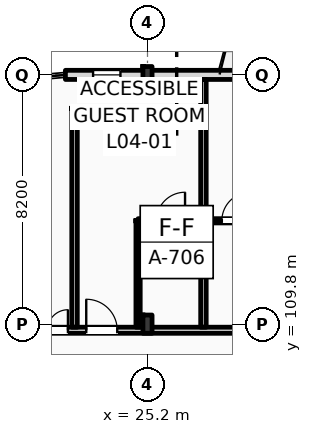
"""IFC4 building model, lengths in metres.
Left out: names, types, materials, properties, quantities, classifications, styles, units other than length and angle.
Written with IfcOpenShell. Run it as: python <this file> out.ifc"""

import sys

from ifc_helpers import new_model, si_unit, direction, frame, frame_2d, origin, origin_2d, place, context, subcontext, project, spatial, rectangle, i_section, extrude, element, fill, save


model = new_model("IFC4")
c1 = context("Model", 3, precision=1e-05, world=origin(), true_north=direction((0.0, 1.0)))
c2 = subcontext(c1, "Body", "Model", "MODEL_VIEW")
j1 = project(units=[si_unit("LENGTHUNIT", "METRE"), si_unit("PLANEANGLEUNIT", "RADIAN")], contexts=[c1])
p1 = place(None, origin())
s1 = spatial("IfcSite", under=j1, at=p1, CompositionType="ELEMENT")
p2 = place(p1, origin())
s2 = spatial("IfcBuilding", under=s1, at=p2, CompositionType="ELEMENT")
p3 = place(p2, frame((0.0, 0.0, 20.4)))
s3 = spatial("IfcBuildingStorey", under=s2, at=p3, CompositionType="ELEMENT", Elevation=20.4)
p4 = place(p3, frame((25.2, 109.8, 0.0), z_axis=(0.0, 0.0, 1.0), x_axis=(1.0, 0.0, 0.0)))
e1 = element("IfcColumn", 1, at=p4, inside=s3, PredefinedType="COLUMN", context=c2, shape_type="SweptSolid", body=[
    extrude(i_section(OverallWidth=0.3, OverallDepth=0.6, WebThickness=0.015, FlangeThickness=0.03, FilletRadius=0.027, at=origin_2d()), origin(), (0.0, 0.0, 1.0), 4.2),
])
p5 = place(p3, frame((25.2, 118.0, 0.0), z_axis=(0.0, 0.0, 1.0), x_axis=(1.0, 0.0, 0.0)))
e2 = element("IfcColumn", 2, at=p5, inside=s3, PredefinedType="COLUMN", context=c2, shape_type="SweptSolid", body=[
    extrude(i_section(OverallWidth=0.3, OverallDepth=0.55, WebThickness=0.015, FlangeThickness=0.029, FilletRadius=0.027, at=origin_2d()), origin(), (0.0, 0.0, 1.0), 4.2),
])
p6 = place(p3, frame((22.5, 118.0, 0.0), z_axis=(0.0, 0.0, 1.0), x_axis=(1.0, 0.0, 0.0)))
e3 = element("IfcWall", 3, at=p6, inside=s3, PredefinedType="STANDARD", context=c2, shape_type="SweptSolid", body=[
    extrude(rectangle(XDim=97.5, YDim=0.3, at=frame_2d((48.75, 0.0))), origin(), (0.0, 0.0, 1.0), 3.38),
])
p7 = place(p6, frame((0.91, 0.0, 0.9)))
e4 = element("IfcOpeningElement", 4, at=p7, cuts=e3, PredefinedType="OPENING", context=c2, shape_type="SweptSolid", body=[
    extrude(rectangle(XDim=0.9, YDim=1.8, at=frame_2d((0.45, 0.9))), frame((0.0, 0.16, 0.0), z_axis=(0.0, -1.0, 0.0), x_axis=(1.0, 0.0, 0.0)), (0.0, 0.0, 1.0), 0.32),
])
p8 = place(p6, frame((6.36, 0.0, 0.0)))
e5 = element("IfcOpeningElement", 5, at=p8, cuts=e3, PredefinedType="OPENING", context=c2, shape_type="SweptSolid", body=[
    extrude(rectangle(XDim=1.2, YDim=2.25, at=frame_2d((0.6, 1.125))), frame((0.0, 0.16, 0.0), z_axis=(0.0, -1.0, 0.0), x_axis=(1.0, 0.0, 0.0)), (0.0, 0.0, 1.0), 0.32),
])
p9 = place(p6, frame((11.41, 0.0, 0.9)))
e6 = element("IfcOpeningElement", 6, at=p9, cuts=e3, PredefinedType="OPENING", context=c2, shape_type="SweptSolid", body=[
    extrude(rectangle(XDim=1.1, YDim=1.9, at=frame_2d((0.55, 0.95))), frame((0.0, 0.16, 0.0), z_axis=(0.0, -1.0, 0.0), x_axis=(1.0, 0.0, 0.0)), (0.0, 0.0, 1.0), 0.32),
])
p10 = place(p6, frame((14.335, 0.0, 0.9)))
e7 = element("IfcOpeningElement", 7, at=p10, cuts=e3, PredefinedType="OPENING", context=c2, shape_type="SweptSolid", body=[
    extrude(rectangle(XDim=1.65, YDim=1.95, at=frame_2d((0.825, 0.975))), frame((0.0, 0.16, 0.0), z_axis=(0.0, -1.0, 0.0), x_axis=(1.0, 0.0, 0.0)), (0.0, 0.0, 1.0), 0.32),
])
p11 = place(p6, frame((19.26, 0.0, 0.9)))
e8 = element("IfcOpeningElement", 8, at=p11, cuts=e3, PredefinedType="OPENING", context=c2, shape_type="SweptSolid", body=[
    extrude(rectangle(XDim=1.35, YDim=2.0, at=frame_2d((0.675, 1.0))), frame((0.0, 0.16, 0.0), z_axis=(0.0, -1.0, 0.0), x_axis=(1.0, 0.0, 0.0)), (0.0, 0.0, 1.0), 0.32),
])
p12 = place(p6, frame((22.8, 0.0, 0.0)))
e9 = element("IfcOpeningElement", 9, at=p12, cuts=e3, PredefinedType="OPENING", context=c2, shape_type="SweptSolid", body=[
    extrude(rectangle(XDim=1.2, YDim=2.25, at=frame_2d((0.6, 1.125))), frame((0.0, 0.16, 0.0), z_axis=(0.0, -1.0, 0.0), x_axis=(1.0, 0.0, 0.0)), (0.0, 0.0, 1.0), 0.32),
])
p13 = place(p6, frame((26.91, 0.0, 0.9)))
e10 = element("IfcOpeningElement", 10, at=p13, cuts=e3, PredefinedType="OPENING", context=c2, shape_type="SweptSolid", body=[
    extrude(rectangle(XDim=2.1, YDim=2.1, at=frame_2d((1.05, 1.05))), frame((0.0, 0.16, 0.0), z_axis=(0.0, -1.0, 0.0), x_axis=(1.0, 0.0, 0.0)), (0.0, 0.0, 1.0), 0.32),
])
p14 = place(p6, frame((30.835, 0.0, 0.9)))
e11 = element("IfcOpeningElement", 11, at=p14, cuts=e3, PredefinedType="OPENING", context=c2, shape_type="SweptSolid", body=[
    extrude(rectangle(XDim=2.25, YDim=2.15, at=frame_2d((1.125, 1.075))), frame((0.0, 0.16, 0.0), z_axis=(0.0, -1.0, 0.0), x_axis=(1.0, 0.0, 0.0)), (0.0, 0.0, 1.0), 0.32),
])
p15 = place(p6, frame((34.96, 0.0, 0.9)))
e12 = element("IfcOpeningElement", 12, at=p15, cuts=e3, PredefinedType="OPENING", context=c2, shape_type="SweptSolid", body=[
    extrude(rectangle(XDim=2.4, YDim=2.2, at=frame_2d((1.2, 1.1))), frame((0.0, 0.16, 0.0), z_axis=(0.0, -1.0, 0.0), x_axis=(1.0, 0.0, 0.0)), (0.0, 0.0, 1.0), 0.32),
])
p16 = place(p6, frame((39.0, 0.0, 0.0)))
e13 = element("IfcOpeningElement", 13, at=p16, cuts=e3, PredefinedType="OPENING", context=c2, shape_type="SweptSolid", body=[
    extrude(rectangle(XDim=1.2, YDim=2.25, at=frame_2d((0.6, 1.125))), frame((0.0, 0.16, 0.0), z_axis=(0.0, -1.0, 0.0), x_axis=(1.0, 0.0, 0.0)), (0.0, 0.0, 1.0), 0.32),
])
p17 = place(p6, frame((43.21, 0.0, 0.9)))
e14 = element("IfcOpeningElement", 14, at=p17, cuts=e3, PredefinedType="OPENING", context=c2, shape_type="SweptSolid", body=[
    extrude(rectangle(XDim=2.7, YDim=2.3, at=frame_2d((1.35, 1.15))), frame((0.0, 0.16, 0.0), z_axis=(0.0, -1.0, 0.0), x_axis=(1.0, 0.0, 0.0)), (0.0, 0.0, 1.0), 0.32),
])
p18 = place(p6, frame((47.335, 0.0, 0.9)))
e15 = element("IfcOpeningElement", 15, at=p18, cuts=e3, PredefinedType="OPENING", context=c2, shape_type="SweptSolid", body=[
    extrude(rectangle(XDim=1.35, YDim=2.3, at=frame_2d((0.675, 1.15))), frame((0.0, 0.16, 0.0), z_axis=(0.0, -1.0, 0.0), x_axis=(1.0, 0.0, 0.0)), (0.0, 0.0, 1.0), 0.32),
])
p19 = place(p6, frame((52.74, 0.0, 0.0)))
e16 = element("IfcOpeningElement", 16, at=p19, cuts=e3, PredefinedType="OPENING", context=c2, shape_type="SweptSolid", body=[
    extrude(rectangle(XDim=1.2, YDim=2.25, at=frame_2d((0.6, 1.125))), frame((0.0, 0.16, 0.0), z_axis=(0.0, -1.0, 0.0), x_axis=(1.0, 0.0, 0.0)), (0.0, 0.0, 1.0), 0.32),
])
p20 = place(p6, frame((55.36, 0.0, 0.9)))
e17 = element("IfcOpeningElement", 17, at=p20, cuts=e3, PredefinedType="OPENING", context=c2, shape_type="SweptSolid", body=[
    extrude(rectangle(XDim=1.1, YDim=2.3, at=frame_2d((0.55, 1.15))), frame((0.0, 0.16, 0.0), z_axis=(0.0, -1.0, 0.0), x_axis=(1.0, 0.0, 0.0)), (0.0, 0.0, 1.0), 0.32),
])
p21 = place(p6, frame((59.99, 0.0, 0.9)))
e18 = element("IfcOpeningElement", 18, at=p21, cuts=e3, PredefinedType="OPENING", context=c2, shape_type="SweptSolid", body=[
    extrude(rectangle(XDim=2.74, YDim=2.3, at=frame_2d((1.37, 1.15))), frame((0.0, 0.16, 0.0), z_axis=(0.0, -1.0, 0.0), x_axis=(1.0, 0.0, 0.0)), (0.0, 0.0, 1.0), 0.32),
])
p22 = place(p6, frame((65.95, 0.0, 0.9)))
e19 = element("IfcOpeningElement", 19, at=p22, cuts=e3, PredefinedType="OPENING", context=c2, shape_type="SweptSolid", body=[
    extrude(rectangle(XDim=1.35, YDim=2.3, at=frame_2d((0.675, 1.15))), frame((0.0, 0.16, 0.0), z_axis=(0.0, -1.0, 0.0), x_axis=(1.0, 0.0, 0.0)), (0.0, 0.0, 1.0), 0.32),
])
p23 = place(p6, frame((69.16, 0.0, 0.0)))
e20 = element("IfcOpeningElement", 20, at=p23, cuts=e3, PredefinedType="OPENING", context=c2, shape_type="SweptSolid", body=[
    extrude(rectangle(XDim=1.2, YDim=2.25, at=frame_2d((0.6, 1.125))), frame((0.0, 0.16, 0.0), z_axis=(0.0, -1.0, 0.0), x_axis=(1.0, 0.0, 0.0)), (0.0, 0.0, 1.0), 0.32),
])
p24 = place(p6, frame((73.75, 0.0, 0.9)))
e21 = element("IfcOpeningElement", 21, at=p24, cuts=e3, PredefinedType="OPENING", context=c2, shape_type="SweptSolid", body=[
    extrude(rectangle(XDim=1.8, YDim=2.3, at=frame_2d((0.9, 1.15))), frame((0.0, 0.16, 0.0), z_axis=(0.0, -1.0, 0.0), x_axis=(1.0, 0.0, 0.0)), (0.0, 0.0, 1.0), 0.32),
])
p25 = place(p6, frame((76.79, 0.0, 0.9)))
e22 = element("IfcOpeningElement", 22, at=p25, cuts=e3, PredefinedType="OPENING", context=c2, shape_type="SweptSolid", body=[
    extrude(rectangle(XDim=2.74, YDim=2.3, at=frame_2d((1.37, 1.15))), frame((0.0, 0.16, 0.0), z_axis=(0.0, -1.0, 0.0), x_axis=(1.0, 0.0, 0.0)), (0.0, 0.0, 1.0), 0.32),
])
p26 = place(p6, frame((81.55, 0.0, 0.9)))
e23 = element("IfcOpeningElement", 23, at=p26, cuts=e3, PredefinedType="OPENING", context=c2, shape_type="SweptSolid", body=[
    extrude(rectangle(XDim=1.8, YDim=2.3, at=frame_2d((0.9, 1.15))), frame((0.0, 0.16, 0.0), z_axis=(0.0, -1.0, 0.0), x_axis=(1.0, 0.0, 0.0)), (0.0, 0.0, 1.0), 0.32),
])
p27 = place(p6, frame((86.01, 0.0, 0.9)))
e24 = element("IfcOpeningElement", 24, at=p27, cuts=e3, PredefinedType="OPENING", context=c2, shape_type="SweptSolid", body=[
    extrude(rectangle(XDim=1.1, YDim=1.5, at=frame_2d((0.55, 0.75))), frame((0.0, 0.16, 0.0), z_axis=(0.0, -1.0, 0.0), x_axis=(1.0, 0.0, 0.0)), (0.0, 0.0, 1.0), 0.32),
])
p28 = place(p6, frame((90.135, 0.0, 0.9)))
e25 = element("IfcOpeningElement", 25, at=p28, cuts=e3, PredefinedType="OPENING", context=c2, shape_type="SweptSolid", body=[
    extrude(rectangle(XDim=1.25, YDim=1.6, at=frame_2d((0.625, 0.8))), frame((0.0, 0.16, 0.0), z_axis=(0.0, -1.0, 0.0), x_axis=(1.0, 0.0, 0.0)), (0.0, 0.0, 1.0), 0.32),
])
p29 = place(p6, frame((94.34, 0.0, 0.9)))
e26 = element("IfcOpeningElement", 26, at=p29, cuts=e3, PredefinedType="OPENING", context=c2, shape_type="SweptSolid", body=[
    extrude(rectangle(XDim=1.4, YDim=1.7, at=frame_2d((0.7, 0.85))), frame((0.0, 0.16, 0.0), z_axis=(0.0, -1.0, 0.0), x_axis=(1.0, 0.0, 0.0)), (0.0, 0.0, 1.0), 0.32),
])
p30 = place(p3, frame((10.65, 109.6, 0.0), z_axis=(0.0, 0.0, 1.0), x_axis=(1.0, 0.0, 0.0)))
e27 = element("IfcWall", 27, at=p30, inside=s3, PredefinedType="PARTITIONING", context=c2, shape_type="SweptSolid", body=[
    extrude(rectangle(XDim=109.21, YDim=0.2, at=frame_2d((54.605, 0.0))), origin(), (0.0, 0.0, 1.0), 3.38),
])
p31 = place(p30, frame((12.535, 0.0, 0.0)))
e28 = element("IfcOpeningElement", 28, at=p31, cuts=e27, PredefinedType="OPENING", context=c2, shape_type="SweptSolid", body=[
    extrude(rectangle(XDim=1.02, YDim=2.2, at=frame_2d((0.51, 1.1))), frame((0.0, 0.11, 0.0), z_axis=(0.0, -1.0, 0.0), x_axis=(1.0, 0.0, 0.0)), (0.0, 0.0, 1.0), 0.22),
])
p32 = place(p30, frame((19.175, 0.0, 0.0)))
e29 = element("IfcOpeningElement", 29, at=p32, cuts=e27, PredefinedType="OPENING", context=c2, shape_type="SweptSolid", body=[
    extrude(rectangle(XDim=1.02, YDim=2.2, at=frame_2d((0.51, 1.1))), frame((0.0, 0.11, 0.0), z_axis=(0.0, -1.0, 0.0), x_axis=(1.0, 0.0, 0.0)), (0.0, 0.0, 1.0), 0.22),
])
p33 = place(p30, frame((23.375, 0.0, 0.0)))
e30 = element("IfcOpeningElement", 30, at=p33, cuts=e27, PredefinedType="OPENING", context=c2, shape_type="SweptSolid", body=[
    extrude(rectangle(XDim=1.02, YDim=2.2, at=frame_2d((0.51, 1.1))), frame((0.0, 0.11, 0.0), z_axis=(0.0, -1.0, 0.0), x_axis=(1.0, 0.0, 0.0)), (0.0, 0.0, 1.0), 0.22),
])
p34 = place(p30, frame((27.575, 0.0, 0.0)))
e31 = element("IfcOpeningElement", 31, at=p34, cuts=e27, PredefinedType="OPENING", context=c2, shape_type="SweptSolid", body=[
    extrude(rectangle(XDim=1.02, YDim=2.2, at=frame_2d((0.51, 1.1))), frame((0.0, 0.11, 0.0), z_axis=(0.0, -1.0, 0.0), x_axis=(1.0, 0.0, 0.0)), (0.0, 0.0, 1.0), 0.22),
])
p35 = place(p30, frame((31.805, 0.0, 0.0)))
e32 = element("IfcOpeningElement", 32, at=p35, cuts=e27, PredefinedType="OPENING", context=c2, shape_type="SweptSolid", body=[
    extrude(rectangle(XDim=0.96, YDim=2.2, at=frame_2d((0.48, 1.1))), frame((0.0, 0.11, 0.0), z_axis=(0.0, -1.0, 0.0), x_axis=(1.0, 0.0, 0.0)), (0.0, 0.0, 1.0), 0.22),
])
p36 = place(p30, frame((33.855, 0.0, 0.0)))
e33 = element("IfcOpeningElement", 33, at=p36, cuts=e27, PredefinedType="OPENING", context=c2, shape_type="SweptSolid", body=[
    extrude(rectangle(XDim=0.96, YDim=2.2, at=frame_2d((0.48, 1.1))), frame((0.0, 0.11, 0.0), z_axis=(0.0, -1.0, 0.0), x_axis=(1.0, 0.0, 0.0)), (0.0, 0.0, 1.0), 0.22),
])
p37 = place(p30, frame((40.205, 0.0, 0.0)))
e34 = element("IfcOpeningElement", 34, at=p37, cuts=e27, PredefinedType="OPENING", context=c2, shape_type="SweptSolid", body=[
    extrude(rectangle(XDim=0.96, YDim=2.2, at=frame_2d((0.48, 1.1))), frame((0.0, 0.11, 0.0), z_axis=(0.0, -1.0, 0.0), x_axis=(1.0, 0.0, 0.0)), (0.0, 0.0, 1.0), 0.22),
])
p38 = place(p30, frame((42.255, 0.0, 0.0)))
e35 = element("IfcOpeningElement", 35, at=p38, cuts=e27, PredefinedType="OPENING", context=c2, shape_type="SweptSolid", body=[
    extrude(rectangle(XDim=0.96, YDim=2.2, at=frame_2d((0.48, 1.1))), frame((0.0, 0.11, 0.0), z_axis=(0.0, -1.0, 0.0), x_axis=(1.0, 0.0, 0.0)), (0.0, 0.0, 1.0), 0.22),
])
p39 = place(p30, frame((48.605, 0.0, 0.0)))
e36 = element("IfcOpeningElement", 36, at=p39, cuts=e27, PredefinedType="OPENING", context=c2, shape_type="SweptSolid", body=[
    extrude(rectangle(XDim=0.96, YDim=2.2, at=frame_2d((0.48, 1.1))), frame((0.0, 0.11, 0.0), z_axis=(0.0, -1.0, 0.0), x_axis=(1.0, 0.0, 0.0)), (0.0, 0.0, 1.0), 0.22),
])
p40 = place(p30, frame((50.655, 0.0, 0.0)))
e37 = element("IfcOpeningElement", 37, at=p40, cuts=e27, PredefinedType="OPENING", context=c2, shape_type="SweptSolid", body=[
    extrude(rectangle(XDim=0.96, YDim=2.2, at=frame_2d((0.48, 1.1))), frame((0.0, 0.11, 0.0), z_axis=(0.0, -1.0, 0.0), x_axis=(1.0, 0.0, 0.0)), (0.0, 0.0, 1.0), 0.22),
])
p41 = place(p30, frame((57.005, 0.0, 0.0)))
e38 = element("IfcOpeningElement", 38, at=p41, cuts=e27, PredefinedType="OPENING", context=c2, shape_type="SweptSolid", body=[
    extrude(rectangle(XDim=0.96, YDim=2.2, at=frame_2d((0.48, 1.1))), frame((0.0, 0.11, 0.0), z_axis=(0.0, -1.0, 0.0), x_axis=(1.0, 0.0, 0.0)), (0.0, 0.0, 1.0), 0.22),
])
p42 = place(p30, frame((59.055, 0.0, 0.0)))
e39 = element("IfcOpeningElement", 39, at=p42, cuts=e27, PredefinedType="OPENING", context=c2, shape_type="SweptSolid", body=[
    extrude(rectangle(XDim=0.96, YDim=2.2, at=frame_2d((0.48, 1.1))), frame((0.0, 0.11, 0.0), z_axis=(0.0, -1.0, 0.0), x_axis=(1.0, 0.0, 0.0)), (0.0, 0.0, 1.0), 0.22),
])
p43 = place(p30, frame((65.405, 0.0, 0.0)))
e40 = element("IfcOpeningElement", 40, at=p43, cuts=e27, PredefinedType="OPENING", context=c2, shape_type="SweptSolid", body=[
    extrude(rectangle(XDim=0.96, YDim=2.2, at=frame_2d((0.48, 1.1))), frame((0.0, 0.11, 0.0), z_axis=(0.0, -1.0, 0.0), x_axis=(1.0, 0.0, 0.0)), (0.0, 0.0, 1.0), 0.22),
])
p44 = place(p30, frame((67.205, 0.0, 0.0)))
e41 = element("IfcOpeningElement", 41, at=p44, cuts=e27, PredefinedType="OPENING", context=c2, shape_type="SweptSolid", body=[
    extrude(rectangle(XDim=0.96, YDim=2.2, at=frame_2d((0.48, 1.1))), frame((0.0, 0.11, 0.0), z_axis=(0.0, -1.0, 0.0), x_axis=(1.0, 0.0, 0.0)), (0.0, 0.0, 1.0), 0.22),
])
p45 = place(p30, frame((73.805, 0.0, 0.0)))
e42 = element("IfcOpeningElement", 42, at=p45, cuts=e27, PredefinedType="OPENING", context=c2, shape_type="SweptSolid", body=[
    extrude(rectangle(XDim=0.96, YDim=2.2, at=frame_2d((0.48, 1.1))), frame((0.0, 0.11, 0.0), z_axis=(0.0, -1.0, 0.0), x_axis=(1.0, 0.0, 0.0)), (0.0, 0.0, 1.0), 0.22),
])
p46 = place(p30, frame((78.255, 0.0, 0.0)))
e43 = element("IfcOpeningElement", 43, at=p46, cuts=e27, PredefinedType="OPENING", context=c2, shape_type="SweptSolid", body=[
    extrude(rectangle(XDim=0.96, YDim=2.2, at=frame_2d((0.48, 1.1))), frame((0.0, 0.11, 0.0), z_axis=(0.0, -1.0, 0.0), x_axis=(1.0, 0.0, 0.0)), (0.0, 0.0, 1.0), 0.22),
])
p47 = place(p30, frame((82.205, 0.0, 0.0)))
e44 = element("IfcOpeningElement", 44, at=p47, cuts=e27, PredefinedType="OPENING", context=c2, shape_type="SweptSolid", body=[
    extrude(rectangle(XDim=0.96, YDim=2.2, at=frame_2d((0.48, 1.1))), frame((0.0, 0.11, 0.0), z_axis=(0.0, -1.0, 0.0), x_axis=(1.0, 0.0, 0.0)), (0.0, 0.0, 1.0), 0.22),
])
p48 = place(p30, frame((86.405, 0.0, 0.0)))
e45 = element("IfcOpeningElement", 45, at=p48, cuts=e27, PredefinedType="OPENING", context=c2, shape_type="SweptSolid", body=[
    extrude(rectangle(XDim=0.96, YDim=2.2, at=frame_2d((0.48, 1.1))), frame((0.0, 0.11, 0.0), z_axis=(0.0, -1.0, 0.0), x_axis=(1.0, 0.0, 0.0)), (0.0, 0.0, 1.0), 0.22),
])
p49 = place(p30, frame((90.605, 0.0, 0.0)))
e46 = element("IfcOpeningElement", 46, at=p49, cuts=e27, PredefinedType="OPENING", context=c2, shape_type="SweptSolid", body=[
    extrude(rectangle(XDim=0.96, YDim=2.2, at=frame_2d((0.48, 1.1))), frame((0.0, 0.11, 0.0), z_axis=(0.0, -1.0, 0.0), x_axis=(1.0, 0.0, 0.0)), (0.0, 0.0, 1.0), 0.22),
])
p50 = place(p30, frame((94.805, 0.0, 0.0)))
e47 = element("IfcOpeningElement", 47, at=p50, cuts=e27, PredefinedType="OPENING", context=c2, shape_type="SweptSolid", body=[
    extrude(rectangle(XDim=0.96, YDim=2.2, at=frame_2d((0.48, 1.1))), frame((0.0, 0.11, 0.0), z_axis=(0.0, -1.0, 0.0), x_axis=(1.0, 0.0, 0.0)), (0.0, 0.0, 1.0), 0.22),
])
p51 = place(p30, frame((99.005, 0.0, 0.0)))
e48 = element("IfcOpeningElement", 48, at=p51, cuts=e27, PredefinedType="OPENING", context=c2, shape_type="SweptSolid", body=[
    extrude(rectangle(XDim=0.96, YDim=2.2, at=frame_2d((0.48, 1.1))), frame((0.0, 0.11, 0.0), z_axis=(0.0, -1.0, 0.0), x_axis=(1.0, 0.0, 0.0)), (0.0, 0.0, 1.0), 0.22),
])
p52 = place(p30, frame((103.205, 0.0, 0.0)))
e49 = element("IfcOpeningElement", 49, at=p52, cuts=e27, PredefinedType="OPENING", context=c2, shape_type="SweptSolid", body=[
    extrude(rectangle(XDim=0.96, YDim=2.2, at=frame_2d((0.48, 1.1))), frame((0.0, 0.11, 0.0), z_axis=(0.0, -1.0, 0.0), x_axis=(1.0, 0.0, 0.0)), (0.0, 0.0, 1.0), 0.22),
])
p53 = place(p30, frame((105.335, 0.0, 0.0)))
e50 = element("IfcOpeningElement", 50, at=p53, cuts=e27, PredefinedType="OPENING", context=c2, shape_type="SweptSolid", body=[
    extrude(rectangle(XDim=0.96, YDim=2.2, at=frame_2d((0.48, 1.1))), frame((0.0, 0.11, 0.0), z_axis=(0.0, -1.0, 0.0), x_axis=(1.0, 0.0, 0.0)), (0.0, 0.0, 1.0), 0.22),
])
p54 = place(p30, frame((2.716, 0.0, 0.0)))
e51 = element("IfcOpeningElement", 51, at=p54, cuts=e27, PredefinedType="OPENING", context=c2, shape_type="SweptSolid", body=[
    extrude(rectangle(XDim=1.35, YDim=2.25, at=frame_2d((0.675, 1.125))), frame((0.0, 0.11, 0.0), z_axis=(0.0, -1.0, 0.0), x_axis=(1.0, 0.0, 0.0)), (0.0, 0.0, 1.0), 0.22),
])
p55 = place(p30, frame((6.65, 0.0, 0.0)))
e52 = element("IfcOpeningElement", 52, at=p55, cuts=e27, PredefinedType="OPENING", context=c2, shape_type="SweptSolid", body=[
    extrude(rectangle(XDim=1.35, YDim=2.25, at=frame_2d((0.675, 1.125))), frame((0.0, 0.11, 0.0), z_axis=(0.0, -1.0, 0.0), x_axis=(1.0, 0.0, 0.0)), (0.0, 0.0, 1.0), 0.22),
])
p56 = place(p30, frame((10.583, 0.0, 0.0)))
e53 = element("IfcOpeningElement", 53, at=p56, cuts=e27, PredefinedType="OPENING", context=c2, shape_type="SweptSolid", body=[
    extrude(rectangle(XDim=1.35, YDim=2.25, at=frame_2d((0.675, 1.125))), frame((0.0, 0.11, 0.0), z_axis=(0.0, -1.0, 0.0), x_axis=(1.0, 0.0, 0.0)), (0.0, 0.0, 1.0), 0.22),
])
p57 = place(p3, frame((27.04, 109.7, 0.0), z_axis=(0.0, 0.0, 1.0), x_axis=(0.0, 1.0, 0.0)))
e54 = element("IfcWall", 54, at=p57, inside=s3, PredefinedType="PARTITIONING", context=c2, shape_type="SweptSolid", body=[
    extrude(rectangle(XDim=8.15, YDim=0.18, at=frame_2d((4.075, 0.0))), origin(), (0.0, 0.0, 1.0), 3.94),
])
p58 = place(p3, frame((24.89, 109.7, 0.0), z_axis=(0.0, 0.0, 1.0), x_axis=(0.0, 1.0, 0.0)))
e55 = element("IfcWall", 55, at=p58, inside=s3, PredefinedType="PARTITIONING", context=c2, shape_type="SweptSolid", body=[
    extrude(rectangle(XDim=3.5, YDim=0.14, at=frame_2d((1.75, 0.0))), origin(), (0.0, 0.0, 1.0), 3.94),
])
p59 = place(p3, frame((24.89, 113.2, 0.0), z_axis=(0.0, 0.0, 1.0), x_axis=(1.0, 0.0, 0.0)))
e56 = element("IfcWall", 56, at=p59, inside=s3, PredefinedType="PARTITIONING", context=c2, shape_type="SweptSolid", body=[
    extrude(rectangle(XDim=2.15, YDim=0.14, at=frame_2d((1.075, 0.0))), origin(), (0.0, 0.0, 1.0), 3.94),
])
p60 = place(p59, frame((0.605, 0.0, 0.0)))
e57 = element("IfcOpeningElement", 57, at=p60, cuts=e56, PredefinedType="OPENING", context=c2, shape_type="SweptSolid", body=[
    extrude(rectangle(XDim=0.94, YDim=2.15, at=frame_2d((0.47, 1.075))), frame((0.0, 0.08, 0.0), z_axis=(0.0, -1.0, 0.0), x_axis=(1.0, 0.0, 0.0)), (0.0, 0.0, 1.0), 0.16),
])
p61 = place(p3, frame((27.04, 113.2, 0.0), z_axis=(0.0, 0.0, 1.0), x_axis=(1.0, 0.0, 0.0)))
e58 = element("IfcWall", 58, at=p61, inside=s3, PredefinedType="PARTITIONING", context=c2, shape_type="SweptSolid", body=[
    extrude(rectangle(XDim=2.15, YDim=0.14, at=frame_2d((1.075, 0.0))), origin(), (0.0, 0.0, 1.0), 3.94),
])
p62 = place(p61, frame((0.605, 0.0, 0.0)))
e59 = element("IfcOpeningElement", 59, at=p62, cuts=e58, PredefinedType="OPENING", context=c2, shape_type="SweptSolid", body=[
    extrude(rectangle(XDim=0.94, YDim=2.15, at=frame_2d((0.47, 1.075))), frame((0.0, 0.08, 0.0), z_axis=(0.0, -1.0, 0.0), x_axis=(1.0, 0.0, 0.0)), (0.0, 0.0, 1.0), 0.16),
])
p63 = place(p3, frame((22.8, 109.7, 0.0), z_axis=(0.0, 0.0, 1.0), x_axis=(0.0, 1.0, 0.0)))
e60 = element("IfcWall", 60, at=p63, inside=s3, PredefinedType="PARTITIONING", context=c2, shape_type="SweptSolid", body=[
    extrude(rectangle(XDim=7.2, YDim=0.18, at=frame_2d((3.6, 0.0))), origin(), (0.0, 0.0, 1.0), 3.94),
])
p64 = place(p7, origin())
e61 = element("IfcWindow", 61, at=p64, inside=s3, PartitioningType="DOUBLE_PANEL_VERTICAL", PredefinedType="WINDOW", context=c2, shape_type="SweptSolid", body=[
    extrude(rectangle(XDim=0.9, YDim=1.8, at=frame_2d((0.45, 0.9))), frame((0.0, 0.03, 0.0), z_axis=(0.0, -1.0, 0.0), x_axis=(1.0, 0.0, 0.0)), (0.0, 0.0, 1.0), 0.06),
])
fill(e4, e61)
p65 = place(p31, origin())
e62 = element("IfcDoor", 62, at=p65, inside=s3, OperationType="SINGLE_SWING_LEFT", PredefinedType="DOOR", context=c2, shape_type="SweptSolid", body=[
    extrude(rectangle(XDim=1.02, YDim=2.2, at=frame_2d((0.51, 1.1))), frame((0.0, 0.025, 0.0), z_axis=(0.0, -1.0, 0.0), x_axis=(1.0, 0.0, 0.0)), (0.0, 0.0, 1.0), 0.05),
])
fill(e28, e62)
p66 = place(p60, origin())
e63 = element("IfcDoor", 63, at=p66, inside=s3, OperationType="SINGLE_SWING_RIGHT", PredefinedType="DOOR", context=c2, shape_type="SweptSolid", body=[
    extrude(rectangle(XDim=0.94, YDim=2.15, at=frame_2d((0.47, 1.075))), frame((0.0, 0.025, 0.0), z_axis=(0.0, -1.0, 0.0), x_axis=(1.0, 0.0, 0.0)), (0.0, 0.0, 1.0), 0.05),
])
fill(e57, e63)
p67 = place(p62, origin())
e64 = element("IfcDoor", 64, at=p67, inside=s3, OperationType="SINGLE_SWING_RIGHT", PredefinedType="DOOR", context=c2, shape_type="SweptSolid", body=[
    extrude(rectangle(XDim=0.94, YDim=2.15, at=frame_2d((0.47, 1.075))), frame((0.0, 0.025, 0.0), z_axis=(0.0, -1.0, 0.0), x_axis=(1.0, 0.0, 0.0)), (0.0, 0.0, 1.0), 0.05),
])
fill(e59, e64)
p68 = place(p56, origin())
e65 = element("IfcDoor", 65, at=p68, inside=s3, OperationType="DOUBLE_SWING_LEFT", PredefinedType="DOOR", context=c2, shape_type="SweptSolid", body=[
    extrude(rectangle(XDim=1.35, YDim=2.25, at=frame_2d((0.675, 1.125))), frame((0.0, 0.025, 0.0), z_axis=(0.0, -1.0, 0.0), x_axis=(1.0, 0.0, 0.0)), (0.0, 0.0, 1.0), 0.05),
])
fill(e53, e65)
save(model, sys.argv[1])
